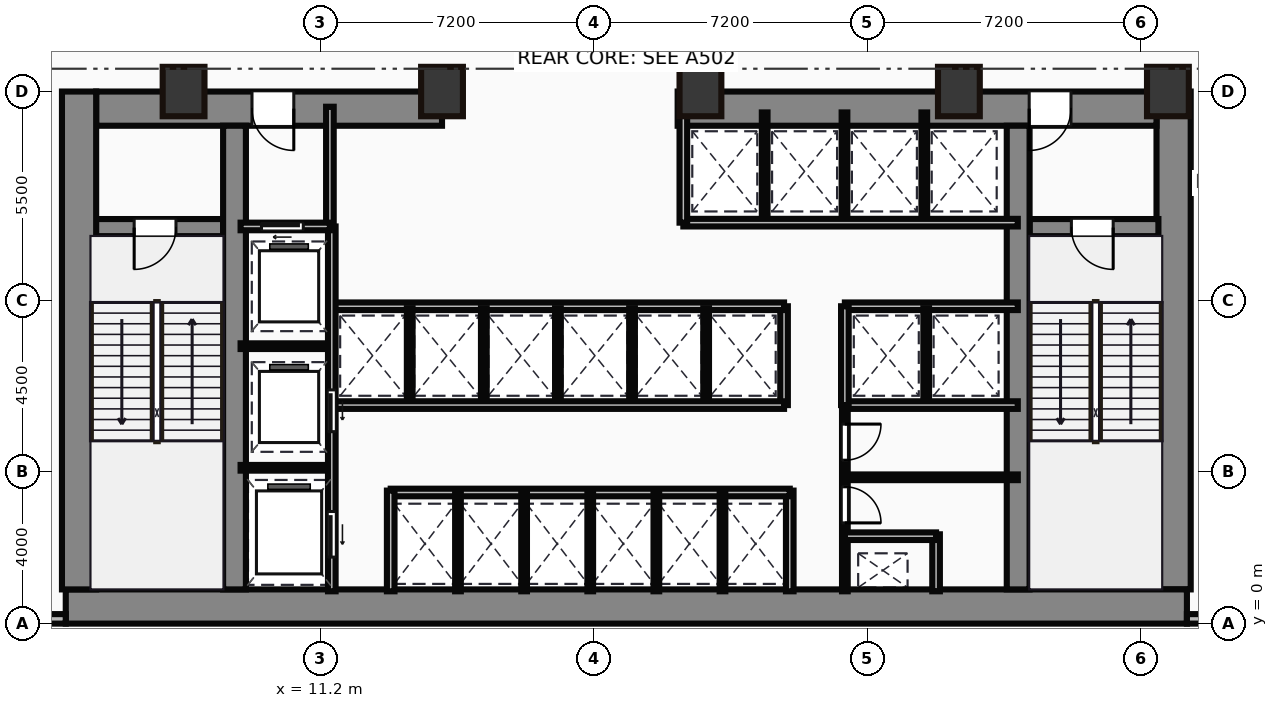
"""IFC4 building model, lengths in metres.
Left out: names, types, materials, properties, quantities, classifications, styles, units other than length and angle.
Written with IfcOpenShell. Run it as: python <this file> out.ifc"""

import sys

from ifc_helpers import new_model, si_unit, direction, frame, frame_2d, origin, origin_2d, place, context, subcontext, project, spatial, rectangle, hollow_rectangle, extrude, source, transform, mapped, element, fill, save


model = new_model("IFC4")
c1 = context("Model", 3, precision=1e-05, world=origin(), true_north=direction((0.0, 1.0)))
c2 = subcontext(c1, "Body", "Model", "MODEL_VIEW")
j1 = project(units=[si_unit("LENGTHUNIT", "METRE"), si_unit("PLANEANGLEUNIT", "RADIAN")], contexts=[c1])
p1 = place(None, origin())
s1 = spatial("IfcSite", under=j1, at=p1, CompositionType="ELEMENT")
p2 = place(p1, origin())
s2 = spatial("IfcBuilding", under=s1, at=p2, CompositionType="ELEMENT")
p3 = place(p2, frame((0.0, 0.0, 21.0)))
s3 = spatial("IfcBuildingStorey", under=s2, at=p3, CompositionType="ELEMENT", Elevation=21.0)
m1 = source(origin(), c2, "Body", "SweptSolid", [
    extrude(rectangle(XDim=29.5, YDim=0.9, at=frame_2d((14.75, 0.0))), origin(), (0.0, 0.0, 1.0), 5.0),
])
p4 = place(p3, frame((4.5, 0.45, 0.0), z_axis=(0.0, 0.0, 1.0), x_axis=(1.0, 0.0, 0.0)))
e1 = element("IfcWall", 1, at=p4, inside=s3, PredefinedType="SHEAR", context=c2, shape_type="MappedRepresentation", body=[
    mapped(m1, transform((0.0, 0.0, 0.0))),
])
m2 = source(origin(), c2, "Body", "SweptSolid", [
    extrude(rectangle(XDim=13.1, YDim=0.9, at=frame_2d((6.55, 0.0))), origin(), (0.0, 0.0, 1.0), 5.0),
])
for number, where, z_axis, x_axis in (
    (2, (4.85, 0.9, 0.0), (0.0, 0.0, 1.0), (0.0, 1.0, 0.0)),
    (3, (33.65, 0.9, 0.0), (0.0, 0.0, 1.0), (0.0, 1.0, 0.0)),
):
    element("IfcWall", number, at=place(p3, frame(where, z_axis=z_axis, x_axis=x_axis)), inside=s3, PredefinedType="SHEAR", context=c2, shape_type="MappedRepresentation", body=[
        mapped(m2, transform((0.0, 0.0, 0.0))),
    ])
m3 = source(origin(), c2, "Body", "SweptSolid", [
    extrude(rectangle(XDim=9.1, YDim=0.9, at=frame_2d((4.55, 0.0))), origin(), (0.0, 0.0, 1.0), 5.0),
])
p5 = place(p3, frame((5.3, 13.55, 0.0), z_axis=(0.0, 0.0, 1.0), x_axis=(1.0, 0.0, 0.0)))
e4 = element("IfcWall", 4, at=p5, inside=s3, PredefinedType="SHEAR", context=c2, shape_type="MappedRepresentation", body=[
    mapped(m3, transform((0.0, 0.0, 0.0))),
])
p6 = place(p5, frame((4.1, 0.0, 0.0)))
e5 = element("IfcOpeningElement", 5, at=p6, cuts=e4, PredefinedType="OPENING", context=c2, shape_type="SweptSolid", body=[
    extrude(rectangle(XDim=1.1, YDim=2.15, at=frame_2d((0.55, 1.075))), frame((0.0, 0.46, 0.0), z_axis=(0.0, -1.0, 0.0), x_axis=(1.0, 0.0, 0.0)), (0.0, 0.0, 1.0), 0.92),
])
m4 = source(origin(), c2, "Body", "SweptSolid", [
    extrude(rectangle(XDim=12.6, YDim=0.9, at=frame_2d((6.3, 0.0))), origin(), (0.0, 0.0, 1.0), 5.0),
])
p7 = place(p3, frame((20.6, 13.55, 0.0), z_axis=(0.0, 0.0, 1.0), x_axis=(1.0, 0.0, 0.0)))
e6 = element("IfcWall", 6, at=p7, inside=s3, PredefinedType="SHEAR", context=c2, shape_type="MappedRepresentation", body=[
    mapped(m4, transform((0.0, 0.0, 0.0))),
])
p8 = place(p7, frame((9.25, 0.0, 0.0)))
e7 = element("IfcOpeningElement", 7, at=p8, cuts=e6, PredefinedType="OPENING", context=c2, shape_type="SweptSolid", body=[
    extrude(rectangle(XDim=1.1, YDim=2.15, at=frame_2d((0.55, 1.075))), frame((0.0, 0.46, 0.0), z_axis=(0.0, -1.0, 0.0), x_axis=(1.0, 0.0, 0.0)), (0.0, 0.0, 1.0), 0.92),
])
m5 = source(origin(), c2, "Body", "SweptSolid", [
    extrude(rectangle(XDim=12.2, YDim=0.6, at=frame_2d((6.1, 0.0))), origin(), (0.0, 0.0, 1.0), 5.0),
])
for number, where, z_axis, x_axis in (
    (8, (8.94, 0.9, 0.0), (0.0, 0.0, 1.0), (0.0, 1.0, 0.0)),
    (9, (29.56, 0.9, 0.0), (0.0, 0.0, 1.0), (0.0, 1.0, 0.0)),
):
    element("IfcWall", number, at=place(p3, frame(where, z_axis=z_axis, x_axis=x_axis)), inside=s3, PredefinedType="SHEAR", context=c2, shape_type="MappedRepresentation", body=[
        mapped(m5, transform((0.0, 0.0, 0.0))),
    ])
m6 = source(origin(), c2, "Body", "SweptSolid", [
    extrude(rectangle(XDim=3.39, YDim=0.45, at=frame_2d((1.695, 0.0))), origin(), (0.0, 0.0, 1.0), 5.0),
])
p9 = place(p3, frame((5.25, 10.42, 0.0), z_axis=(0.0, 0.0, 1.0), x_axis=(1.0, 0.0, 0.0)))
e10 = element("IfcWall", 10, at=p9, inside=s3, PredefinedType="SHEAR", context=c2, shape_type="MappedRepresentation", body=[
    mapped(m6, transform((0.0, 0.0, 0.0))),
])
p10 = place(p9, frame((1.05, 0.0, 0.0)))
e11 = element("IfcOpeningElement", 11, at=p10, cuts=e10, PredefinedType="OPENING", context=c2, shape_type="SweptSolid", body=[
    extrude(rectangle(XDim=1.1, YDim=2.15, at=frame_2d((0.55, 1.075))), frame((0.0, 0.235, 0.0), z_axis=(0.0, -1.0, 0.0), x_axis=(1.0, 0.0, 0.0)), (0.0, 0.0, 1.0), 0.47),
])
p11 = place(p3, frame((29.86, 10.42, 0.0), z_axis=(0.0, 0.0, 1.0), x_axis=(1.0, 0.0, 0.0)))
e12 = element("IfcWall", 12, at=p11, inside=s3, PredefinedType="SHEAR", context=c2, shape_type="MappedRepresentation", body=[
    mapped(m6, transform((0.0, 0.0, 0.0))),
])
p12 = place(p11, frame((1.1, 0.0, 0.0)))
e13 = element("IfcOpeningElement", 13, at=p12, cuts=e12, PredefinedType="OPENING", context=c2, shape_type="SweptSolid", body=[
    extrude(rectangle(XDim=1.1, YDim=2.15, at=frame_2d((0.55, 1.075))), frame((0.0, 0.235, 0.0), z_axis=(0.0, -1.0, 0.0), x_axis=(1.0, 0.0, 0.0)), (0.0, 0.0, 1.0), 0.47),
])
m7 = source(origin(), c2, "Body", "SweptSolid", [
    extrude(hollow_rectangle(XDim=1.1, YDim=1.3, WallThickness=0.055, at=origin_2d()), origin(), (0.0, 0.0, 1.0), 5.0),
])
for number, where, z_axis, x_axis in (
    (14, (7.6, 14.0, 0.0), (0.0, 0.0, 1.0), (1.0, 0.0, 0.0)),
    (15, (14.4, 14.0, 0.0), (0.0, 0.0, 1.0), (1.0, 0.0, 0.0)),
    (16, (21.2, 14.0, 0.0), (0.0, 0.0, 1.0), (1.0, 0.0, 0.0)),
    (17, (28.0, 14.0, 0.0), (0.0, 0.0, 1.0), (1.0, 0.0, 0.0)),
    (18, (33.5, 14.0, 0.0), (0.0, 0.0, 1.0), (1.0, 0.0, 0.0)),
):
    element("IfcColumn", number, at=place(p3, frame(where, z_axis=z_axis, x_axis=x_axis)), inside=s3, PredefinedType="PILASTER", context=c2, shape_type="MappedRepresentation", body=[
        mapped(m7, transform((0.0, 0.0, 0.0))),
    ])
m8 = source(origin(), c2, "Body", "SweptSolid", [
    extrude(rectangle(XDim=4.5, YDim=0.25, at=frame_2d((2.25, 0.0))), origin(), (0.0, 0.0, 1.0), 4.7),
])
p13 = place(p3, frame((0.0, 0.125, 0.0), z_axis=(0.0, 0.0, 1.0), x_axis=(1.0, 0.0, 0.0)))
e19 = element("IfcWall", 19, at=p13, inside=s3, PredefinedType="STANDARD", context=c2, shape_type="MappedRepresentation", body=[
    mapped(m8, transform((0.0, 0.0, 0.0))),
])
m9 = source(origin(), c2, "Body", "SweptSolid", [
    extrude(rectangle(XDim=48.0, YDim=0.25, at=frame_2d((24.0, 0.0))), origin(), (0.0, 0.0, 1.0), 4.7),
])
p14 = place(p3, frame((34.0, 0.125, 0.0), z_axis=(0.0, 0.0, 1.0), x_axis=(1.0, 0.0, 0.0)))
e20 = element("IfcWall", 20, at=p14, inside=s3, PredefinedType="STANDARD", context=c2, shape_type="MappedRepresentation", body=[
    mapped(m9, transform((0.0, 0.0, 0.0))),
])
m10 = source(origin(), c2, "Body", "SweptSolid", [
    extrude(rectangle(XDim=3.18, YDim=0.2, at=frame_2d((1.59, 0.0))), origin(), (0.0, 0.0, 1.0), 4.7),
])
p15 = place(p3, frame((11.45, 10.42, 0.0), z_axis=(0.0, 0.0, 1.0), x_axis=(0.0, 1.0, 0.0)))
e21 = element("IfcWall", 21, at=p15, inside=s3, PredefinedType="PARTITIONING", context=c2, shape_type="MappedRepresentation", body=[
    mapped(m10, transform((0.0, 0.0, 0.0))),
])
m11 = source(origin(), c2, "Body", "SweptSolid", [
    extrude(rectangle(XDim=2.35, YDim=0.2, at=frame_2d((1.175, 0.0))), origin(), (0.0, 0.0, 1.0), 4.7),
])
p16 = place(p3, frame((9.1, 10.45, 0.0), z_axis=(0.0, 0.0, 1.0), x_axis=(1.0, 0.0, 0.0)))
e22 = element("IfcWall", 22, at=p16, inside=s3, PredefinedType="PARTITIONING", context=c2, shape_type="MappedRepresentation", body=[
    mapped(m11, transform((0.0, 0.0, 0.0))),
])
p17 = place(p16, frame((0.55, 0.0, 0.0)))
e23 = element("IfcOpeningElement", 23, at=p17, cuts=e22, PredefinedType="OPENING", context=c2, shape_type="SweptSolid", body=[
    extrude(rectangle(XDim=1.1, YDim=2.15, at=frame_2d((0.55, 1.075))), frame((0.0, 0.11, 0.0), z_axis=(0.0, -1.0, 0.0), x_axis=(1.0, 0.0, 0.0)), (0.0, 0.0, 1.0), 0.22),
])
m12 = source(origin(), c2, "Body", "SweptSolid", [
    extrude(rectangle(XDim=9.6, YDim=0.2, at=frame_2d((4.8, 0.0))), origin(), (0.0, 0.0, 1.0), 4.7),
])
p18 = place(p3, frame((11.5, 0.85, 0.0), z_axis=(0.0, 0.0, 1.0), x_axis=(0.0, 1.0, 0.0)))
e24 = element("IfcWall", 24, at=p18, inside=s3, PredefinedType="PARTITIONING", context=c2, shape_type="MappedRepresentation", body=[
    mapped(m12, transform((0.0, 0.0, 0.0))),
])
p19 = place(p18, frame((4.2, 0.0, 0.0)))
e25 = element("IfcOpeningElement", 25, at=p19, cuts=e24, PredefinedType="OPENING", context=c2, shape_type="SweptSolid", body=[
    extrude(rectangle(XDim=1.1, YDim=2.15, at=frame_2d((0.55, 1.075))), frame((0.0, 0.11, 0.0), z_axis=(0.0, -1.0, 0.0), x_axis=(1.0, 0.0, 0.0)), (0.0, 0.0, 1.0), 0.22),
])
p20 = place(p18, frame((0.9, 0.0, 0.0)))
e26 = element("IfcOpeningElement", 26, at=p20, cuts=e24, PredefinedType="OPENING", context=c2, shape_type="SweptSolid", body=[
    extrude(rectangle(XDim=1.2, YDim=2.15, at=frame_2d((0.6, 1.075))), frame((0.0, 0.11, 0.0), z_axis=(0.0, -1.0, 0.0), x_axis=(1.0, 0.0, 0.0)), (0.0, 0.0, 1.0), 0.22),
])
m13 = source(origin(), c2, "Body", "SweptSolid", [
    extrude(rectangle(XDim=2.4, YDim=0.15, at=frame_2d((1.2, 0.0))), origin(), (0.0, 0.0, 1.0), 4.7),
])
for number, where, z_axis, x_axis in (
    (27, (9.1, 4.1, 0.0), (0.0, 0.0, 1.0), (1.0, 0.0, 0.0)),
    (28, (9.1, 7.3, 0.0), (0.0, 0.0, 1.0), (1.0, 0.0, 0.0)),
):
    element("IfcWall", number, at=place(p3, frame(where, z_axis=z_axis, x_axis=x_axis)), inside=s3, PredefinedType="PARTITIONING", context=c2, shape_type="MappedRepresentation", body=[
        mapped(m13, transform((0.0, 0.0, 0.0))),
    ])
m14 = source(origin(), c2, "Body", "SweptSolid", [
    extrude(rectangle(XDim=2.65, YDim=0.2, at=frame_2d((1.325, 0.0))), origin(), (0.0, 0.0, 1.0), 4.7),
])
p21 = place(p3, frame((13.05, 0.85, 0.0), z_axis=(0.0, 0.0, 1.0), x_axis=(0.0, 1.0, 0.0)))
e29 = element("IfcWall", 29, at=p21, inside=s3, PredefinedType="PARTITIONING", context=c2, shape_type="MappedRepresentation", body=[
    mapped(m14, transform((0.0, 0.0, 0.0))),
])
m15 = source(origin(), c2, "Body", "SweptSolid", [
    extrude(rectangle(XDim=10.5, YDim=0.2, at=frame_2d((5.25, 0.0))), origin(), (0.0, 0.0, 1.0), 4.7),
])
p22 = place(p3, frame((13.05, 3.45, 0.0), z_axis=(0.0, 0.0, 1.0), x_axis=(1.0, 0.0, 0.0)))
e30 = element("IfcWall", 30, at=p22, inside=s3, PredefinedType="PARTITIONING", context=c2, shape_type="MappedRepresentation", body=[
    mapped(m15, transform((0.0, 0.0, 0.0))),
])
p23 = place(p3, frame((23.55, 0.85, 0.0), z_axis=(0.0, 0.0, 1.0), x_axis=(0.0, 1.0, 0.0)))
e31 = element("IfcWall", 31, at=p23, inside=s3, PredefinedType="PARTITIONING", context=c2, shape_type="MappedRepresentation", body=[
    mapped(m14, transform((0.0, 0.0, 0.0))),
])
m16 = source(origin(), c2, "Body", "SweptSolid", [
    extrude(rectangle(XDim=2.6, YDim=0.15, at=frame_2d((1.3, 0.0))), origin(), (0.0, 0.0, 1.0), 4.7),
])
for number, where, z_axis, x_axis in (
    (32, (14.82, 0.85, 0.0), (0.0, 0.0, 1.0), (0.0, 1.0, 0.0)),
    (33, (16.56, 0.85, 0.0), (0.0, 0.0, 1.0), (0.0, 1.0, 0.0)),
    (34, (18.3, 0.85, 0.0), (0.0, 0.0, 1.0), (0.0, 1.0, 0.0)),
    (35, (20.04, 0.85, 0.0), (0.0, 0.0, 1.0), (0.0, 1.0, 0.0)),
    (36, (21.78, 0.85, 0.0), (0.0, 0.0, 1.0), (0.0, 1.0, 0.0)),
):
    element("IfcWall", number, at=place(p3, frame(where, z_axis=z_axis, x_axis=x_axis)), inside=s3, PredefinedType="PARTITIONING", context=c2, shape_type="MappedRepresentation", body=[
        mapped(m16, transform((0.0, 0.0, 0.0))),
    ])
m17 = source(origin(), c2, "Body", "SweptSolid", [
    extrude(rectangle(XDim=11.85, YDim=0.2, at=frame_2d((5.925, 0.0))), origin(), (0.0, 0.0, 1.0), 4.7),
])
for number, where, z_axis, x_axis in (
    (37, (11.55, 5.75, 0.0), (0.0, 0.0, 1.0), (1.0, 0.0, 0.0)),
    (38, (11.55, 8.35, 0.0), (0.0, 0.0, 1.0), (1.0, 0.0, 0.0)),
):
    element("IfcWall", number, at=place(p3, frame(where, z_axis=z_axis, x_axis=x_axis)), inside=s3, PredefinedType="PARTITIONING", context=c2, shape_type="MappedRepresentation", body=[
        mapped(m17, transform((0.0, 0.0, 0.0))),
    ])
m18 = source(origin(), c2, "Body", "SweptSolid", [
    extrude(rectangle(XDim=2.6, YDim=0.2, at=frame_2d((1.3, 0.0))), origin(), (0.0, 0.0, 1.0), 4.7),
])
p24 = place(p3, frame((23.4, 5.75, 0.0), z_axis=(0.0, 0.0, 1.0), x_axis=(0.0, 1.0, 0.0)))
e39 = element("IfcWall", 39, at=p24, inside=s3, PredefinedType="PARTITIONING", context=c2, shape_type="MappedRepresentation", body=[
    mapped(m18, transform((0.0, 0.0, 0.0))),
])
m19 = source(origin(), c2, "Body", "SweptSolid", [
    extrude(rectangle(XDim=2.5, YDim=0.15, at=frame_2d((1.25, 0.0))), origin(), (0.0, 0.0, 1.0), 4.7),
])
for number, where, z_axis, x_axis in (
    (40, (13.55, 5.8, 0.0), (0.0, 0.0, 1.0), (0.0, 1.0, 0.0)),
    (41, (15.5, 5.8, 0.0), (0.0, 0.0, 1.0), (0.0, 1.0, 0.0)),
    (42, (17.45, 5.8, 0.0), (0.0, 0.0, 1.0), (0.0, 1.0, 0.0)),
    (43, (19.4, 5.8, 0.0), (0.0, 0.0, 1.0), (0.0, 1.0, 0.0)),
    (44, (21.35, 5.8, 0.0), (0.0, 0.0, 1.0), (0.0, 1.0, 0.0)),
):
    element("IfcWall", number, at=place(p3, frame(where, z_axis=z_axis, x_axis=x_axis)), inside=s3, PredefinedType="PARTITIONING", context=c2, shape_type="MappedRepresentation", body=[
        mapped(m19, transform((0.0, 0.0, 0.0))),
    ])
m20 = source(origin(), c2, "Body", "SweptSolid", [
    extrude(rectangle(XDim=8.8, YDim=0.2, at=frame_2d((4.4, 0.0))), origin(), (0.0, 0.0, 1.0), 4.7),
])
p25 = place(p3, frame((20.75, 10.55, 0.0), z_axis=(0.0, 0.0, 1.0), x_axis=(1.0, 0.0, 0.0)))
e45 = element("IfcWall", 45, at=p25, inside=s3, PredefinedType="PARTITIONING", context=c2, shape_type="MappedRepresentation", body=[
    mapped(m20, transform((0.0, 0.0, 0.0))),
])
m21 = source(origin(), c2, "Body", "SweptSolid", [
    extrude(rectangle(XDim=3.0, YDim=0.2, at=frame_2d((1.5, 0.0))), origin(), (0.0, 0.0, 1.0), 4.7),
])
p26 = place(p3, frame((20.75, 10.55, 0.0), z_axis=(0.0, 0.0, 1.0), x_axis=(0.0, 1.0, 0.0)))
e46 = element("IfcWall", 46, at=p26, inside=s3, PredefinedType="PARTITIONING", context=c2, shape_type="MappedRepresentation", body=[
    mapped(m21, transform((0.0, 0.0, 0.0))),
])
m22 = source(origin(), c2, "Body", "SweptSolid", [
    extrude(rectangle(XDim=2.85, YDim=0.15, at=frame_2d((1.425, 0.0))), origin(), (0.0, 0.0, 1.0), 4.7),
])
for number, where, z_axis, x_axis in (
    (47, (22.89, 10.6, 0.0), (0.0, 0.0, 1.0), (0.0, 1.0, 0.0)),
    (48, (24.99, 10.6, 0.0), (0.0, 0.0, 1.0), (0.0, 1.0, 0.0)),
    (49, (27.09, 10.6, 0.0), (0.0, 0.0, 1.0), (0.0, 1.0, 0.0)),
):
    element("IfcWall", number, at=place(p3, frame(where, z_axis=z_axis, x_axis=x_axis)), inside=s3, PredefinedType="PARTITIONING", context=c2, shape_type="MappedRepresentation", body=[
        mapped(m22, transform((0.0, 0.0, 0.0))),
    ])
m23 = source(origin(), c2, "Body", "SweptSolid", [
    extrude(rectangle(XDim=4.55, YDim=0.2, at=frame_2d((2.275, 0.0))), origin(), (0.0, 0.0, 1.0), 4.7),
])
for number, where, z_axis, x_axis in (
    (50, (25.0, 8.35, 0.0), (0.0, 0.0, 1.0), (1.0, 0.0, 0.0)),
    (51, (25.0, 5.75, 0.0), (0.0, 0.0, 1.0), (1.0, 0.0, 0.0)),
):
    element("IfcWall", number, at=place(p3, frame(where, z_axis=z_axis, x_axis=x_axis)), inside=s3, PredefinedType="PARTITIONING", context=c2, shape_type="MappedRepresentation", body=[
        mapped(m23, transform((0.0, 0.0, 0.0))),
    ])
p27 = place(p3, frame((25.0, 5.75, 0.0), z_axis=(0.0, 0.0, 1.0), x_axis=(0.0, 1.0, 0.0)))
e52 = element("IfcWall", 52, at=p27, inside=s3, PredefinedType="PARTITIONING", context=c2, shape_type="MappedRepresentation", body=[
    mapped(m18, transform((0.0, 0.0, 0.0))),
])
p28 = place(p3, frame((27.14, 5.8, 0.0), z_axis=(0.0, 0.0, 1.0), x_axis=(0.0, 1.0, 0.0)))
e53 = element("IfcWall", 53, at=p28, inside=s3, PredefinedType="PARTITIONING", context=c2, shape_type="MappedRepresentation", body=[
    mapped(m19, transform((0.0, 0.0, 0.0))),
])
m24 = source(origin(), c2, "Body", "SweptSolid", [
    extrude(rectangle(XDim=4.9, YDim=0.15, at=frame_2d((2.45, 0.0))), origin(), (0.0, 0.0, 1.0), 4.7),
])
p29 = place(p3, frame((25.0, 0.85, 0.0), z_axis=(0.0, 0.0, 1.0), x_axis=(0.0, 1.0, 0.0)))
e54 = element("IfcWall", 54, at=p29, inside=s3, PredefinedType="PARTITIONING", context=c2, shape_type="MappedRepresentation", body=[
    mapped(m24, transform((0.0, 0.0, 0.0))),
])
p30 = place(p29, frame((1.8, 0.0, 0.0)))
e55 = element("IfcOpeningElement", 55, at=p30, cuts=e54, PredefinedType="OPENING", context=c2, shape_type="SweptSolid", body=[
    extrude(rectangle(XDim=0.95, YDim=2.15, at=frame_2d((0.475, 1.075))), frame((0.0, 0.085, 0.0), z_axis=(0.0, -1.0, 0.0), x_axis=(1.0, 0.0, 0.0)), (0.0, 0.0, 1.0), 0.17),
])
p31 = place(p29, frame((3.45, 0.0, 0.0)))
e56 = element("IfcOpeningElement", 56, at=p31, cuts=e54, PredefinedType="OPENING", context=c2, shape_type="SweptSolid", body=[
    extrude(rectangle(XDim=0.95, YDim=2.15, at=frame_2d((0.475, 1.075))), frame((0.0, 0.085, 0.0), z_axis=(0.0, -1.0, 0.0), x_axis=(1.0, 0.0, 0.0)), (0.0, 0.0, 1.0), 0.17),
])
m25 = source(origin(), c2, "Body", "SweptSolid", [
    extrude(rectangle(XDim=2.4, YDim=0.2, at=frame_2d((1.2, 0.0))), origin(), (0.0, 0.0, 1.0), 4.7),
])
p32 = place(p3, frame((25.0, 2.3, 0.0), z_axis=(0.0, 0.0, 1.0), x_axis=(1.0, 0.0, 0.0)))
e57 = element("IfcWall", 57, at=p32, inside=s3, PredefinedType="PARTITIONING", context=c2, shape_type="MappedRepresentation", body=[
    mapped(m25, transform((0.0, 0.0, 0.0))),
])
m26 = source(origin(), c2, "Body", "SweptSolid", [
    extrude(rectangle(XDim=1.5, YDim=0.2, at=frame_2d((0.75, 0.0))), origin(), (0.0, 0.0, 1.0), 4.7),
])
p33 = place(p3, frame((27.4, 0.85, 0.0), z_axis=(0.0, 0.0, 1.0), x_axis=(0.0, 1.0, 0.0)))
e58 = element("IfcWall", 58, at=p33, inside=s3, PredefinedType="PARTITIONING", context=c2, shape_type="MappedRepresentation", body=[
    mapped(m26, transform((0.0, 0.0, 0.0))),
])
m27 = source(origin(), c2, "Body", "SweptSolid", [
    extrude(rectangle(XDim=4.55, YDim=0.15, at=frame_2d((2.275, 0.0))), origin(), (0.0, 0.0, 1.0), 4.7),
])
p34 = place(p3, frame((25.0, 3.85, 0.0), z_axis=(0.0, 0.0, 1.0), x_axis=(1.0, 0.0, 0.0)))
e59 = element("IfcWall", 59, at=p34, inside=s3, PredefinedType="PARTITIONING", context=c2, shape_type="MappedRepresentation", body=[
    mapped(m27, transform((0.0, 0.0, 0.0))),
])
m28 = source(origin(), c2, "Body", "SweptSolid", [
    extrude(rectangle(XDim=1.1, YDim=2.15, at=frame_2d((0.55, 1.075))), frame((0.0, 0.025, 0.0), z_axis=(0.0, -1.0, 0.0), x_axis=(1.0, 0.0, 0.0)), (0.0, 0.0, 1.0), 0.05),
])
p35 = place(p10, frame((1.1, 0.0, 0.0), z_axis=(0.0, 0.0, 1.0), x_axis=(-1.0, 0.0, 0.0)))
e60 = element("IfcDoor", 60, at=p35, inside=s3, OperationType="SINGLE_SWING_LEFT", PredefinedType="DOOR", context=c2, shape_type="MappedRepresentation", body=[
    mapped(m28, transform((0.0, 0.0, 0.0))),
])
fill(e11, e60)
p36 = place(p12, frame((1.1, 0.0, 0.0), z_axis=(0.0, 0.0, 1.0), x_axis=(-1.0, 0.0, 0.0)))
e61 = element("IfcDoor", 61, at=p36, inside=s3, OperationType="SINGLE_SWING_RIGHT", PredefinedType="DOOR", context=c2, shape_type="MappedRepresentation", body=[
    mapped(m28, transform((0.0, 0.0, 0.0))),
])
fill(e13, e61)
p37 = place(p6, origin())
e62 = element("IfcDoor", 62, at=p37, inside=s3, OperationType="SINGLE_SWING_RIGHT", PredefinedType="DOOR", context=c2, shape_type="MappedRepresentation", body=[
    mapped(m28, transform((0.0, 0.0, 0.0))),
])
fill(e5, e62)
p38 = place(p8, origin())
e63 = element("IfcDoor", 63, at=p38, inside=s3, OperationType="SINGLE_SWING_LEFT", PredefinedType="DOOR", context=c2, shape_type="MappedRepresentation", body=[
    mapped(m28, transform((0.0, 0.0, 0.0))),
])
fill(e7, e63)
p39 = place(p17, origin())
e64 = element("IfcDoor", 64, at=p39, inside=s3, OperationType="SLIDING_TO_LEFT", PredefinedType="DOOR", context=c2, shape_type="MappedRepresentation", body=[
    mapped(m28, transform((0.0, 0.0, 0.0))),
])
fill(e23, e64)
p40 = place(p19, frame((1.1, 0.0, 0.0), z_axis=(0.0, 0.0, 1.0), x_axis=(-1.0, 0.0, 0.0)))
e65 = element("IfcDoor", 65, at=p40, inside=s3, OperationType="SLIDING_TO_LEFT", PredefinedType="DOOR", context=c2, shape_type="MappedRepresentation", body=[
    mapped(m28, transform((0.0, 0.0, 0.0))),
])
fill(e25, e65)
m29 = source(origin(), c2, "Body", "SweptSolid", [
    extrude(rectangle(XDim=1.2, YDim=2.15, at=frame_2d((0.6, 1.075))), frame((0.0, 0.025, 0.0), z_axis=(0.0, -1.0, 0.0), x_axis=(1.0, 0.0, 0.0)), (0.0, 0.0, 1.0), 0.05),
])
p41 = place(p20, frame((1.2, 0.0, 0.0), z_axis=(0.0, 0.0, 1.0), x_axis=(-1.0, 0.0, 0.0)))
e66 = element("IfcDoor", 66, at=p41, inside=s3, OperationType="SLIDING_TO_LEFT", PredefinedType="DOOR", context=c2, shape_type="MappedRepresentation", body=[
    mapped(m29, transform((0.0, 0.0, 0.0))),
])
fill(e26, e66)
m30 = source(origin(), c2, "Body", "SweptSolid", [
    extrude(rectangle(XDim=0.95, YDim=2.15, at=frame_2d((0.475, 1.075))), frame((0.0, 0.025, 0.0), z_axis=(0.0, -1.0, 0.0), x_axis=(1.0, 0.0, 0.0)), (0.0, 0.0, 1.0), 0.05),
])
p42 = place(p30, origin())
e67 = element("IfcDoor", 67, at=p42, inside=s3, OperationType="SINGLE_SWING_LEFT", PredefinedType="DOOR", context=c2, shape_type="MappedRepresentation", body=[
    mapped(m30, transform((0.0, 0.0, 0.0))),
])
fill(e55, e67)
p43 = place(p31, origin())
e68 = element("IfcDoor", 68, at=p43, inside=s3, OperationType="SINGLE_SWING_RIGHT", PredefinedType="DOOR", context=c2, shape_type="MappedRepresentation", body=[
    mapped(m30, transform((0.0, 0.0, 0.0))),
])
fill(e56, e68)
save(model, sys.argv[1])
